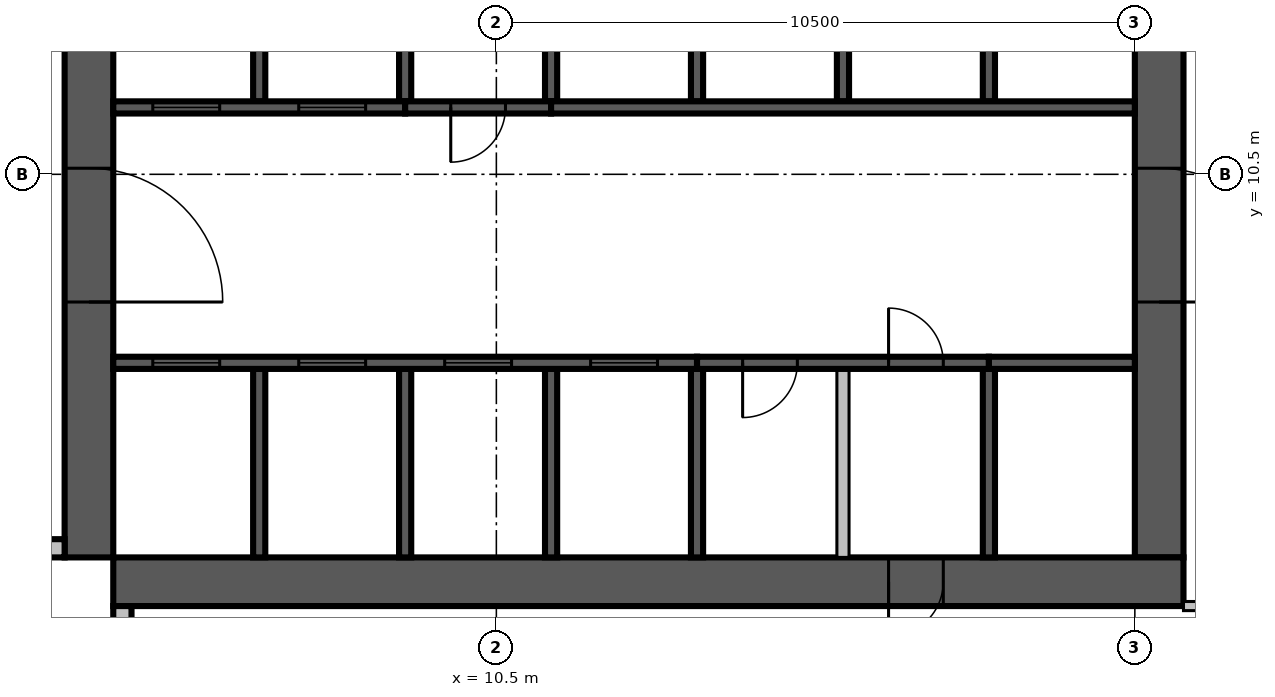
"""IFC4 building model, lengths in metres.
Left out: names, types, materials, properties, quantities, classifications, styles, units other than length and angle.
Written with IfcOpenShell. Run it as: python <this file> out.ifc"""

import sys

from ifc_helpers import new_model, si_unit, direction, frame, frame_2d, origin, place, context, subcontext, project, spatial, rectangle, extrude, source, transform, mapped, element, fill, save


model = new_model("IFC4")
c1 = context("Model", 3, precision=1e-05, world=origin(), true_north=direction((0.0, 1.0)))
c2 = subcontext(c1, "Body", "Model", "MODEL_VIEW")
j1 = project(units=[si_unit("LENGTHUNIT", "METRE"), si_unit("PLANEANGLEUNIT", "RADIAN")], contexts=[c1])
p1 = place(None, origin())
s1 = spatial("IfcSite", under=j1, at=p1, CompositionType="ELEMENT")
p2 = place(p1, origin())
s2 = spatial("IfcBuilding", under=s1, at=p2, CompositionType="ELEMENT")
p3 = place(p2, frame((0.0, 0.0, 215.8)))
s3 = spatial("IfcBuildingStorey", under=s2, at=p3, CompositionType="ELEMENT", Elevation=215.8)
m1 = source(origin(), c2, "Body", "SweptSolid", [
    extrude(rectangle(XDim=17.6, YDim=0.8, at=frame_2d((8.8, 0.0))), origin(), (0.0, 0.0, 1.0), 3.8),
])
p4 = place(p3, frame((3.8, 4.2, 0.0), z_axis=(0.0, 0.0, 1.0), x_axis=(0.0, 1.0, 0.0)))
e1 = element("IfcWall", 1, at=p4, inside=s3, PredefinedType="SHEAR", context=c2, shape_type="MappedRepresentation", body=[
    mapped(m1, transform((0.0, 0.0, 0.0), scale=1.0)),
])
m2 = source(origin(), c2, "Body", "SweptSolid", [
    extrude(rectangle(XDim=2.2, YDim=2.1, at=frame_2d((1.1, 1.05))), frame((0.0, 0.41, 0.0), z_axis=(0.0, -1.0, 0.0), x_axis=(1.0, 0.0, 0.0)), (0.0, 0.0, 1.0), 0.82),
])
p5 = place(p4, frame((4.2, 0.0, 0.0)))
e2 = element("IfcOpeningElement", 2, at=p5, cuts=e1, PredefinedType="OPENING", context=c2, shape_type="MappedRepresentation", body=[
    mapped(m2, transform((0.0, 0.0, 0.0), scale=1.0)),
])
m3 = source(origin(), c2, "Body", "SweptSolid", [
    extrude(rectangle(XDim=0.9, YDim=2.1, at=frame_2d((0.45, 1.05))), frame((0.0, 0.41, 0.0), z_axis=(0.0, -1.0, 0.0), x_axis=(1.0, 0.0, 0.0)), (0.0, 0.0, 1.0), 0.82),
])
p6 = place(p4, frame((10.95, 0.0, 0.0)))
e3 = element("IfcOpeningElement", 3, at=p6, cuts=e1, PredefinedType="OPENING", context=c2, shape_type="MappedRepresentation", body=[
    mapped(m3, transform((0.0, 0.0, 0.0), scale=1.0)),
])
m4 = source(origin(), c2, "Body", "SweptSolid", [
    extrude(rectangle(XDim=16.8, YDim=0.8, at=frame_2d((8.4, 0.0))), origin(), (0.0, 0.0, 1.0), 3.8),
])
p7 = place(p3, frame((21.4, 4.2, 0.0), z_axis=(0.0, 0.0, 1.0), x_axis=(0.0, 1.0, 0.0)))
e4 = element("IfcWall", 4, at=p7, inside=s3, PredefinedType="SHEAR", context=c2, shape_type="MappedRepresentation", body=[
    mapped(m4, transform((0.0, 0.0, 0.0), scale=1.0)),
])
p8 = place(p7, frame((4.2, 0.0, 0.0)))
e5 = element("IfcOpeningElement", 5, at=p8, cuts=e4, PredefinedType="OPENING", context=c2, shape_type="MappedRepresentation", body=[
    mapped(m2, transform((0.0, 0.0, 0.0), scale=1.0)),
])
m5 = source(origin(), c2, "Body", "SweptSolid", [
    extrude(rectangle(XDim=1.2, YDim=2.1, at=frame_2d((0.6, 1.05))), frame((0.0, 0.41, 0.0), z_axis=(0.0, -1.0, 0.0), x_axis=(1.0, 0.0, 0.0)), (0.0, 0.0, 1.0), 0.82),
])
p9 = place(p7, frame((14.7, 0.0, 0.0)))
e6 = element("IfcOpeningElement", 6, at=p9, cuts=e4, PredefinedType="OPENING", context=c2, shape_type="MappedRepresentation", body=[
    mapped(m5, transform((0.0, 0.0, 0.0), scale=1.0)),
])
p10 = place(p3, frame((4.2, 3.8, 0.0), z_axis=(0.0, 0.0, 1.0), x_axis=(1.0, 0.0, 0.0)))
e7 = element("IfcWall", 7, at=p10, inside=s3, PredefinedType="SHEAR", context=c2, shape_type="MappedRepresentation", body=[
    mapped(m1, transform((0.0, 0.0, 0.0), scale=1.0)),
])
p11 = place(p10, frame((12.75, 0.0, 0.0)))
e8 = element("IfcOpeningElement", 8, at=p11, cuts=e7, PredefinedType="OPENING", context=c2, shape_type="MappedRepresentation", body=[
    mapped(m3, transform((0.0, 0.0, 0.0), scale=1.0)),
])
m6 = source(origin(), c2, "Body", "SweptSolid", [
    extrude(rectangle(XDim=3.4, YDim=0.3, at=frame_2d((1.7, 0.0))), origin(), (0.0, 0.0, 1.0), 3.4),
])
p12 = place(p3, frame((0.0, 4.35, 0.0), z_axis=(0.0, 0.0, 1.0), x_axis=(1.0, 0.0, 0.0)))
e9 = element("IfcWall", 9, at=p12, inside=s3, PredefinedType="STANDARD", context=c2, shape_type="MappedRepresentation", body=[
    mapped(m6, transform((0.0, 0.0, 0.0), scale=1.0)),
])
m7 = source(origin(), c2, "Body", "SweptSolid", [
    extrude(rectangle(XDim=1.8, YDim=2.3, at=frame_2d((0.9, 1.15))), frame((0.0, 0.16, 0.0), z_axis=(0.0, -1.0, 0.0), x_axis=(1.0, 0.0, 0.0)), (0.0, 0.0, 1.0), 0.32),
])
p13 = place(p12, frame((1.2, 0.0, 0.6)))
e10 = element("IfcOpeningElement", 10, at=p13, cuts=e9, PredefinedType="OPENING", context=c2, shape_type="MappedRepresentation", body=[
    mapped(m7, transform((0.0, 0.0, 0.0), scale=1.0)),
])
p14 = place(p3, frame((4.35, 3.4, 0.0), z_axis=(0.0, 0.0, 1.0), x_axis=(0.0, -1.0, 0.0)))
e11 = element("IfcWall", 11, at=p14, inside=s3, PredefinedType="STANDARD", context=c2, shape_type="MappedRepresentation", body=[
    mapped(m6, transform((0.0, 0.0, 0.0), scale=1.0)),
])
p15 = place(p14, frame((0.4, 0.0, 0.6)))
e12 = element("IfcOpeningElement", 12, at=p15, cuts=e11, PredefinedType="OPENING", context=c2, shape_type="MappedRepresentation", body=[
    mapped(m7, transform((0.0, 0.0, 0.0), scale=1.0)),
])
m8 = source(origin(), c2, "Body", "SweptSolid", [
    extrude(rectangle(XDim=3.1, YDim=0.2, at=frame_2d((1.55, 0.0))), origin(), (0.0, 0.0, 1.0), 3.8),
])
for number, where, z_axis, x_axis in (
    (13, (6.6, 4.2, 0.0), (0.0, 0.0, 1.0), (0.0, 1.0, 0.0)),
    (14, (9.0, 4.2, 0.0), (0.0, 0.0, 1.0), (0.0, 1.0, 0.0)),
    (15, (11.4, 4.2, 0.0), (0.0, 0.0, 1.0), (0.0, 1.0, 0.0)),
):
    element("IfcWall", number, at=place(p3, frame(where, z_axis=z_axis, x_axis=x_axis)), inside=s3, PredefinedType="SOLIDWALL", context=c2, shape_type="MappedRepresentation", body=[
        mapped(m8, transform((0.0, 0.0, 0.0), scale=1.0)),
    ])
m9 = source(origin(), c2, "Body", "SweptSolid", [
    extrude(rectangle(XDim=3.1, YDim=0.2, at=frame_2d((1.55, 0.0))), origin(), (0.0, 0.0, 1.0), 3.4),
])
for number, where, z_axis, x_axis in (
    (16, (13.8, 4.2, 0.0), (0.0, 0.0, 1.0), (0.0, 1.0, 0.0)),
    (17, (18.6, 4.2, 0.0), (0.0, 0.0, 1.0), (0.0, 1.0, 0.0)),
):
    element("IfcWall", number, at=place(p3, frame(where, z_axis=z_axis, x_axis=x_axis)), inside=s3, PredefinedType="SOLIDWALL", context=c2, shape_type="MappedRepresentation", body=[
        mapped(m9, transform((0.0, 0.0, 0.0), scale=1.0)),
    ])
m10 = source(origin(), c2, "Body", "SweptSolid", [
    extrude(rectangle(XDim=3.1, YDim=0.2, at=frame_2d((1.55, 0.0))), origin(), (0.0, 0.0, 1.0), 3.4),
])
p16 = place(p3, frame((16.2, 4.2, 0.0), z_axis=(0.0, 0.0, 1.0), x_axis=(0.0, 1.0, 0.0)))
e18 = element("IfcWall", 18, at=p16, inside=s3, PredefinedType="PARTITIONING", context=c2, shape_type="MappedRepresentation", body=[
    mapped(m10, transform((0.0, 0.0, 0.0), scale=1.0)),
])
m11 = source(origin(), c2, "Body", "SweptSolid", [
    extrude(rectangle(XDim=3.0, YDim=0.2, at=frame_2d((1.5, 0.0))), origin(), (0.0, 0.0, 1.0), 3.8),
])
p17 = place(p3, frame((6.6, 11.7, 0.0), z_axis=(0.0, 0.0, 1.0), x_axis=(0.0, 1.0, 0.0)))
e19 = element("IfcWall", 19, at=p17, inside=s3, PredefinedType="SOLIDWALL", context=c2, shape_type="MappedRepresentation", body=[
    mapped(m11, transform((0.0, 0.0, 0.0), scale=1.0)),
])
m12 = source(origin(), c2, "Body", "SweptSolid", [
    extrude(rectangle(XDim=3.0, YDim=0.2, at=frame_2d((1.5, 0.0))), origin(), (0.0, 0.0, 1.0), 3.4),
])
for number, where, z_axis, x_axis in (
    (20, (9.0, 11.7, 0.0), (0.0, 0.0, 1.0), (0.0, 1.0, 0.0)),
    (21, (11.4, 11.7, 0.0), (0.0, 0.0, 1.0), (0.0, 1.0, 0.0)),
):
    element("IfcWall", number, at=place(p3, frame(where, z_axis=z_axis, x_axis=x_axis)), inside=s3, PredefinedType="SOLIDWALL", context=c2, shape_type="MappedRepresentation", body=[
        mapped(m12, transform((0.0, 0.0, 0.0), scale=1.0)),
    ])
for number, where, z_axis, x_axis in (
    (22, (13.8, 11.7, 0.0), (0.0, 0.0, 1.0), (0.0, 1.0, 0.0)),
    (23, (16.2, 11.7, 0.0), (0.0, 0.0, 1.0), (0.0, 1.0, 0.0)),
    (24, (18.6, 11.7, 0.0), (0.0, 0.0, 1.0), (0.0, 1.0, 0.0)),
):
    element("IfcWall", number, at=place(p3, frame(where, z_axis=z_axis, x_axis=x_axis)), inside=s3, PredefinedType="SOLIDWALL", context=c2, shape_type="MappedRepresentation", body=[
        mapped(m11, transform((0.0, 0.0, 0.0), scale=1.0)),
    ])
m13 = source(origin(), c2, "Body", "SweptSolid", [
    extrude(rectangle(XDim=9.6, YDim=0.2, at=frame_2d((4.8, 0.0))), origin(), (0.0, 0.0, 1.0), 3.8),
])
p18 = place(p3, frame((4.2, 7.4, 0.0), z_axis=(0.0, 0.0, 1.0), x_axis=(1.0, 0.0, 0.0)))
e25 = element("IfcWall", 25, at=p18, inside=s3, PredefinedType="SOLIDWALL", context=c2, shape_type="MappedRepresentation", body=[
    mapped(m13, transform((0.0, 0.0, 0.0), scale=1.0)),
])
m14 = source(origin(), c2, "Body", "SweptSolid", [
    extrude(rectangle(XDim=1.1, YDim=2.1, at=frame_2d((0.55, 1.05))), frame((0.0, 0.11, 0.0), z_axis=(0.0, -1.0, 0.0), x_axis=(1.0, 0.0, 0.0)), (0.0, 0.0, 1.0), 0.22),
])
p19 = place(p18, frame((0.65, 0.0, 0.0)))
e26 = element("IfcOpeningElement", 26, at=p19, cuts=e25, PredefinedType="OPENING", context=c2, shape_type="MappedRepresentation", body=[
    mapped(m14, transform((0.0, 0.0, 0.0), scale=1.0)),
])
p20 = place(p18, frame((3.05, 0.0, 0.0)))
e27 = element("IfcOpeningElement", 27, at=p20, cuts=e25, PredefinedType="OPENING", context=c2, shape_type="MappedRepresentation", body=[
    mapped(m14, transform((0.0, 0.0, 0.0), scale=1.0)),
])
p21 = place(p18, frame((5.45, 0.0, 0.0)))
e28 = element("IfcOpeningElement", 28, at=p21, cuts=e25, PredefinedType="OPENING", context=c2, shape_type="MappedRepresentation", body=[
    mapped(m14, transform((0.0, 0.0, 0.0), scale=1.0)),
])
p22 = place(p18, frame((7.85, 0.0, 0.0)))
e29 = element("IfcOpeningElement", 29, at=p22, cuts=e25, PredefinedType="OPENING", context=c2, shape_type="MappedRepresentation", body=[
    mapped(m14, transform((0.0, 0.0, 0.0), scale=1.0)),
])
m15 = source(origin(), c2, "Body", "SweptSolid", [
    extrude(rectangle(XDim=4.8, YDim=0.2, at=frame_2d((2.4, 0.0))), origin(), (0.0, 0.0, 1.0), 3.4),
])
p23 = place(p3, frame((13.8, 7.4, 0.0), z_axis=(0.0, 0.0, 1.0), x_axis=(1.0, 0.0, 0.0)))
e30 = element("IfcWall", 30, at=p23, inside=s3, PredefinedType="SOLIDWALL", context=c2, shape_type="MappedRepresentation", body=[
    mapped(m15, transform((0.0, 0.0, 0.0), scale=1.0)),
])
m16 = source(origin(), c2, "Body", "SweptSolid", [
    extrude(rectangle(XDim=0.9, YDim=2.1, at=frame_2d((0.45, 1.05))), frame((0.0, 0.11, 0.0), z_axis=(0.0, -1.0, 0.0), x_axis=(1.0, 0.0, 0.0)), (0.0, 0.0, 1.0), 0.22),
])
p24 = place(p23, frame((0.75, 0.0, 0.0)))
e31 = element("IfcOpeningElement", 31, at=p24, cuts=e30, PredefinedType="OPENING", context=c2, shape_type="MappedRepresentation", body=[
    mapped(m16, transform((0.0, 0.0, 0.0), scale=1.0)),
])
p25 = place(p23, frame((3.15, 0.0, 0.0)))
e32 = element("IfcOpeningElement", 32, at=p25, cuts=e30, PredefinedType="OPENING", context=c2, shape_type="MappedRepresentation", body=[
    mapped(m16, transform((0.0, 0.0, 0.0), scale=1.0)),
])
m17 = source(origin(), c2, "Body", "SweptSolid", [
    extrude(rectangle(XDim=2.4, YDim=0.2, at=frame_2d((1.2, 0.0))), origin(), (0.0, 0.0, 1.0), 3.8),
])
p26 = place(p3, frame((18.6, 7.4, 0.0), z_axis=(0.0, 0.0, 1.0), x_axis=(1.0, 0.0, 0.0)))
e33 = element("IfcWall", 33, at=p26, inside=s3, PredefinedType="SOLIDWALL", context=c2, shape_type="MappedRepresentation", body=[
    mapped(m17, transform((0.0, 0.0, 0.0), scale=1.0)),
])
m18 = source(origin(), c2, "Body", "SweptSolid", [
    extrude(rectangle(XDim=4.8, YDim=0.2, at=frame_2d((2.4, 0.0))), origin(), (0.0, 0.0, 1.0), 3.8),
])
p27 = place(p3, frame((4.2, 11.6, 0.0), z_axis=(0.0, 0.0, 1.0), x_axis=(1.0, 0.0, 0.0)))
e34 = element("IfcWall", 34, at=p27, inside=s3, PredefinedType="SOLIDWALL", context=c2, shape_type="MappedRepresentation", body=[
    mapped(m18, transform((0.0, 0.0, 0.0), scale=1.0)),
])
p28 = place(p27, frame((0.65, 0.0, 0.0)))
e35 = element("IfcOpeningElement", 35, at=p28, cuts=e34, PredefinedType="OPENING", context=c2, shape_type="MappedRepresentation", body=[
    mapped(m14, transform((0.0, 0.0, 0.0), scale=1.0)),
])
p29 = place(p27, frame((3.05, 0.0, 0.0)))
e36 = element("IfcOpeningElement", 36, at=p29, cuts=e34, PredefinedType="OPENING", context=c2, shape_type="MappedRepresentation", body=[
    mapped(m14, transform((0.0, 0.0, 0.0), scale=1.0)),
])
m19 = source(origin(), c2, "Body", "SweptSolid", [
    extrude(rectangle(XDim=2.4, YDim=0.2, at=frame_2d((1.2, 0.0))), origin(), (0.0, 0.0, 1.0), 3.4),
])
p30 = place(p3, frame((9.0, 11.6, 0.0), z_axis=(0.0, 0.0, 1.0), x_axis=(1.0, 0.0, 0.0)))
e37 = element("IfcWall", 37, at=p30, inside=s3, PredefinedType="SOLIDWALL", context=c2, shape_type="MappedRepresentation", body=[
    mapped(m19, transform((0.0, 0.0, 0.0), scale=1.0)),
])
p31 = place(p30, frame((0.75, 0.0, 0.0)))
e38 = element("IfcOpeningElement", 38, at=p31, cuts=e37, PredefinedType="OPENING", context=c2, shape_type="MappedRepresentation", body=[
    mapped(m16, transform((0.0, 0.0, 0.0), scale=1.0)),
])
p32 = place(p3, frame((11.4, 11.6, 0.0), z_axis=(0.0, 0.0, 1.0), x_axis=(1.0, 0.0, 0.0)))
e39 = element("IfcWall", 39, at=p32, inside=s3, PredefinedType="SOLIDWALL", context=c2, shape_type="MappedRepresentation", body=[
    mapped(m13, transform((0.0, 0.0, 0.0), scale=1.0)),
])
m20 = source(origin(), c2, "Body", "SweptSolid", [
    extrude(rectangle(XDim=7.525, YDim=0.15, at=frame_2d((3.763, 0.0))), origin(), (0.0, 0.0, 1.0), 2.9),
])
p33 = place(p3, frame((21.8, 3.4, 0.0), z_axis=(0.0, 0.0, 1.0), x_axis=(1.0, 0.0, 0.0)))
e40 = element("IfcWall", 40, at=p33, inside=s3, PredefinedType="PARTITIONING", context=c2, shape_type="MappedRepresentation", body=[
    mapped(m20, transform((0.0, 0.0, 0.0), scale=1.0)),
])
m21 = source(origin(), c2, "Body", "SweptSolid", [
    extrude(rectangle(XDim=1.0, YDim=2.1, at=frame_2d((0.5, 1.05))), frame((0.0, 0.085, 0.0), z_axis=(0.0, -1.0, 0.0), x_axis=(1.0, 0.0, 0.0)), (0.0, 0.0, 1.0), 0.17),
])
p34 = place(p33, frame((3.3, 0.0, 0.0)))
e41 = element("IfcOpeningElement", 41, at=p34, cuts=e40, PredefinedType="OPENING", context=c2, shape_type="MappedRepresentation", body=[
    mapped(m21, transform((0.0, 0.0, 0.0), scale=1.0)),
])
m22 = source(origin(), c2, "Body", "SweptSolid", [
    extrude(rectangle(XDim=0.9, YDim=2.1, at=frame_2d((0.45, 1.05))), frame((0.0, 0.085, 0.0), z_axis=(0.0, -1.0, 0.0), x_axis=(1.0, 0.0, 0.0)), (0.0, 0.0, 1.0), 0.17),
])
p35 = place(p33, frame((4.363, 0.0, 0.0)))
e42 = element("IfcOpeningElement", 42, at=p35, cuts=e40, PredefinedType="OPENING", context=c2, shape_type="MappedRepresentation", body=[
    mapped(m22, transform((0.0, 0.0, 0.0), scale=1.0)),
])
m23 = source(origin(), c2, "Body", "SweptSolid", [
    extrude(rectangle(XDim=1.1, YDim=2.1, at=frame_2d((0.55, 1.05))), frame((0.0, 0.025, 0.0), z_axis=(0.0, -1.0, 0.0), x_axis=(1.0, 0.0, 0.0)), (0.0, 0.0, 1.0), 0.05),
])
p36 = place(p19, origin())
e43 = element("IfcDoor", 43, at=p36, inside=s3, OperationType="SLIDING_TO_LEFT", PredefinedType="DOOR", context=c2, shape_type="MappedRepresentation", body=[
    mapped(m23, transform((0.0, 0.0, 0.0), scale=1.0)),
])
fill(e26, e43)
p37 = place(p20, origin())
e44 = element("IfcDoor", 44, at=p37, inside=s3, OperationType="SLIDING_TO_LEFT", PredefinedType="DOOR", context=c2, shape_type="MappedRepresentation", body=[
    mapped(m23, transform((0.0, 0.0, 0.0), scale=1.0)),
])
fill(e27, e44)
p38 = place(p21, origin())
e45 = element("IfcDoor", 45, at=p38, inside=s3, OperationType="SLIDING_TO_LEFT", PredefinedType="DOOR", context=c2, shape_type="MappedRepresentation", body=[
    mapped(m23, transform((0.0, 0.0, 0.0), scale=1.0)),
])
fill(e28, e45)
p39 = place(p22, origin())
e46 = element("IfcDoor", 46, at=p39, inside=s3, OperationType="SLIDING_TO_LEFT", PredefinedType="DOOR", context=c2, shape_type="MappedRepresentation", body=[
    mapped(m23, transform((0.0, 0.0, 0.0), scale=1.0)),
])
fill(e29, e46)
m24 = source(origin(), c2, "Body", "SweptSolid", [
    extrude(rectangle(XDim=0.9, YDim=2.1, at=frame_2d((0.45, 1.05))), frame((0.0, 0.025, 0.0), z_axis=(0.0, -1.0, 0.0), x_axis=(1.0, 0.0, 0.0)), (0.0, 0.0, 1.0), 0.05),
])
p40 = place(p24, origin())
e47 = element("IfcDoor", 47, at=p40, inside=s3, OperationType="SINGLE_SWING_RIGHT", PredefinedType="DOOR", context=c2, shape_type="MappedRepresentation", body=[
    mapped(m24, transform((0.0, 0.0, 0.0), scale=1.0)),
])
fill(e31, e47)
p41 = place(p25, origin())
e48 = element("IfcDoor", 48, at=p41, inside=s3, OperationType="SINGLE_SWING_LEFT", PredefinedType="DOOR", context=c2, shape_type="MappedRepresentation", body=[
    mapped(m24, transform((0.0, 0.0, 0.0), scale=1.0)),
])
fill(e32, e48)
p42 = place(p28, origin())
e49 = element("IfcDoor", 49, at=p42, inside=s3, OperationType="SLIDING_TO_LEFT", PredefinedType="DOOR", context=c2, shape_type="MappedRepresentation", body=[
    mapped(m23, transform((0.0, 0.0, 0.0), scale=1.0)),
])
fill(e35, e49)
p43 = place(p29, origin())
e50 = element("IfcDoor", 50, at=p43, inside=s3, OperationType="SLIDING_TO_LEFT", PredefinedType="DOOR", context=c2, shape_type="MappedRepresentation", body=[
    mapped(m23, transform((0.0, 0.0, 0.0), scale=1.0)),
])
fill(e36, e50)
p44 = place(p31, origin())
e51 = element("IfcDoor", 51, at=p44, inside=s3, OperationType="SINGLE_SWING_RIGHT", PredefinedType="DOOR", context=c2, shape_type="MappedRepresentation", body=[
    mapped(m24, transform((0.0, 0.0, 0.0), scale=1.0)),
])
fill(e38, e51)
m25 = source(origin(), c2, "Body", "SweptSolid", [
    extrude(rectangle(XDim=2.2, YDim=2.1, at=frame_2d((1.1, 1.05))), frame((0.0, 0.025, 0.0), z_axis=(0.0, -1.0, 0.0), x_axis=(1.0, 0.0, 0.0)), (0.0, 0.0, 1.0), 0.05),
])
p45 = place(p8, origin())
e52 = element("IfcDoor", 52, at=p45, inside=s3, OperationType="DOUBLE_DOOR_SINGLE_SWING", PredefinedType="DOOR", context=c2, shape_type="MappedRepresentation", body=[
    mapped(m25, transform((0.0, 0.0, 0.0), scale=1.0)),
])
fill(e5, e52)
p46 = place(p5, origin())
e53 = element("IfcDoor", 53, at=p46, inside=s3, OperationType="DOUBLE_DOOR_SINGLE_SWING", PredefinedType="DOOR", context=c2, shape_type="MappedRepresentation", body=[
    mapped(m25, transform((0.0, 0.0, 0.0), scale=1.0)),
])
fill(e2, e53)
p47 = place(p11, origin())
e54 = element("IfcDoor", 54, at=p47, inside=s3, OperationType="SINGLE_SWING_RIGHT", PredefinedType="DOOR", context=c2, shape_type="MappedRepresentation", body=[
    mapped(m24, transform((0.0, 0.0, 0.0), scale=1.0)),
])
fill(e8, e54)
save(model, sys.argv[1])
